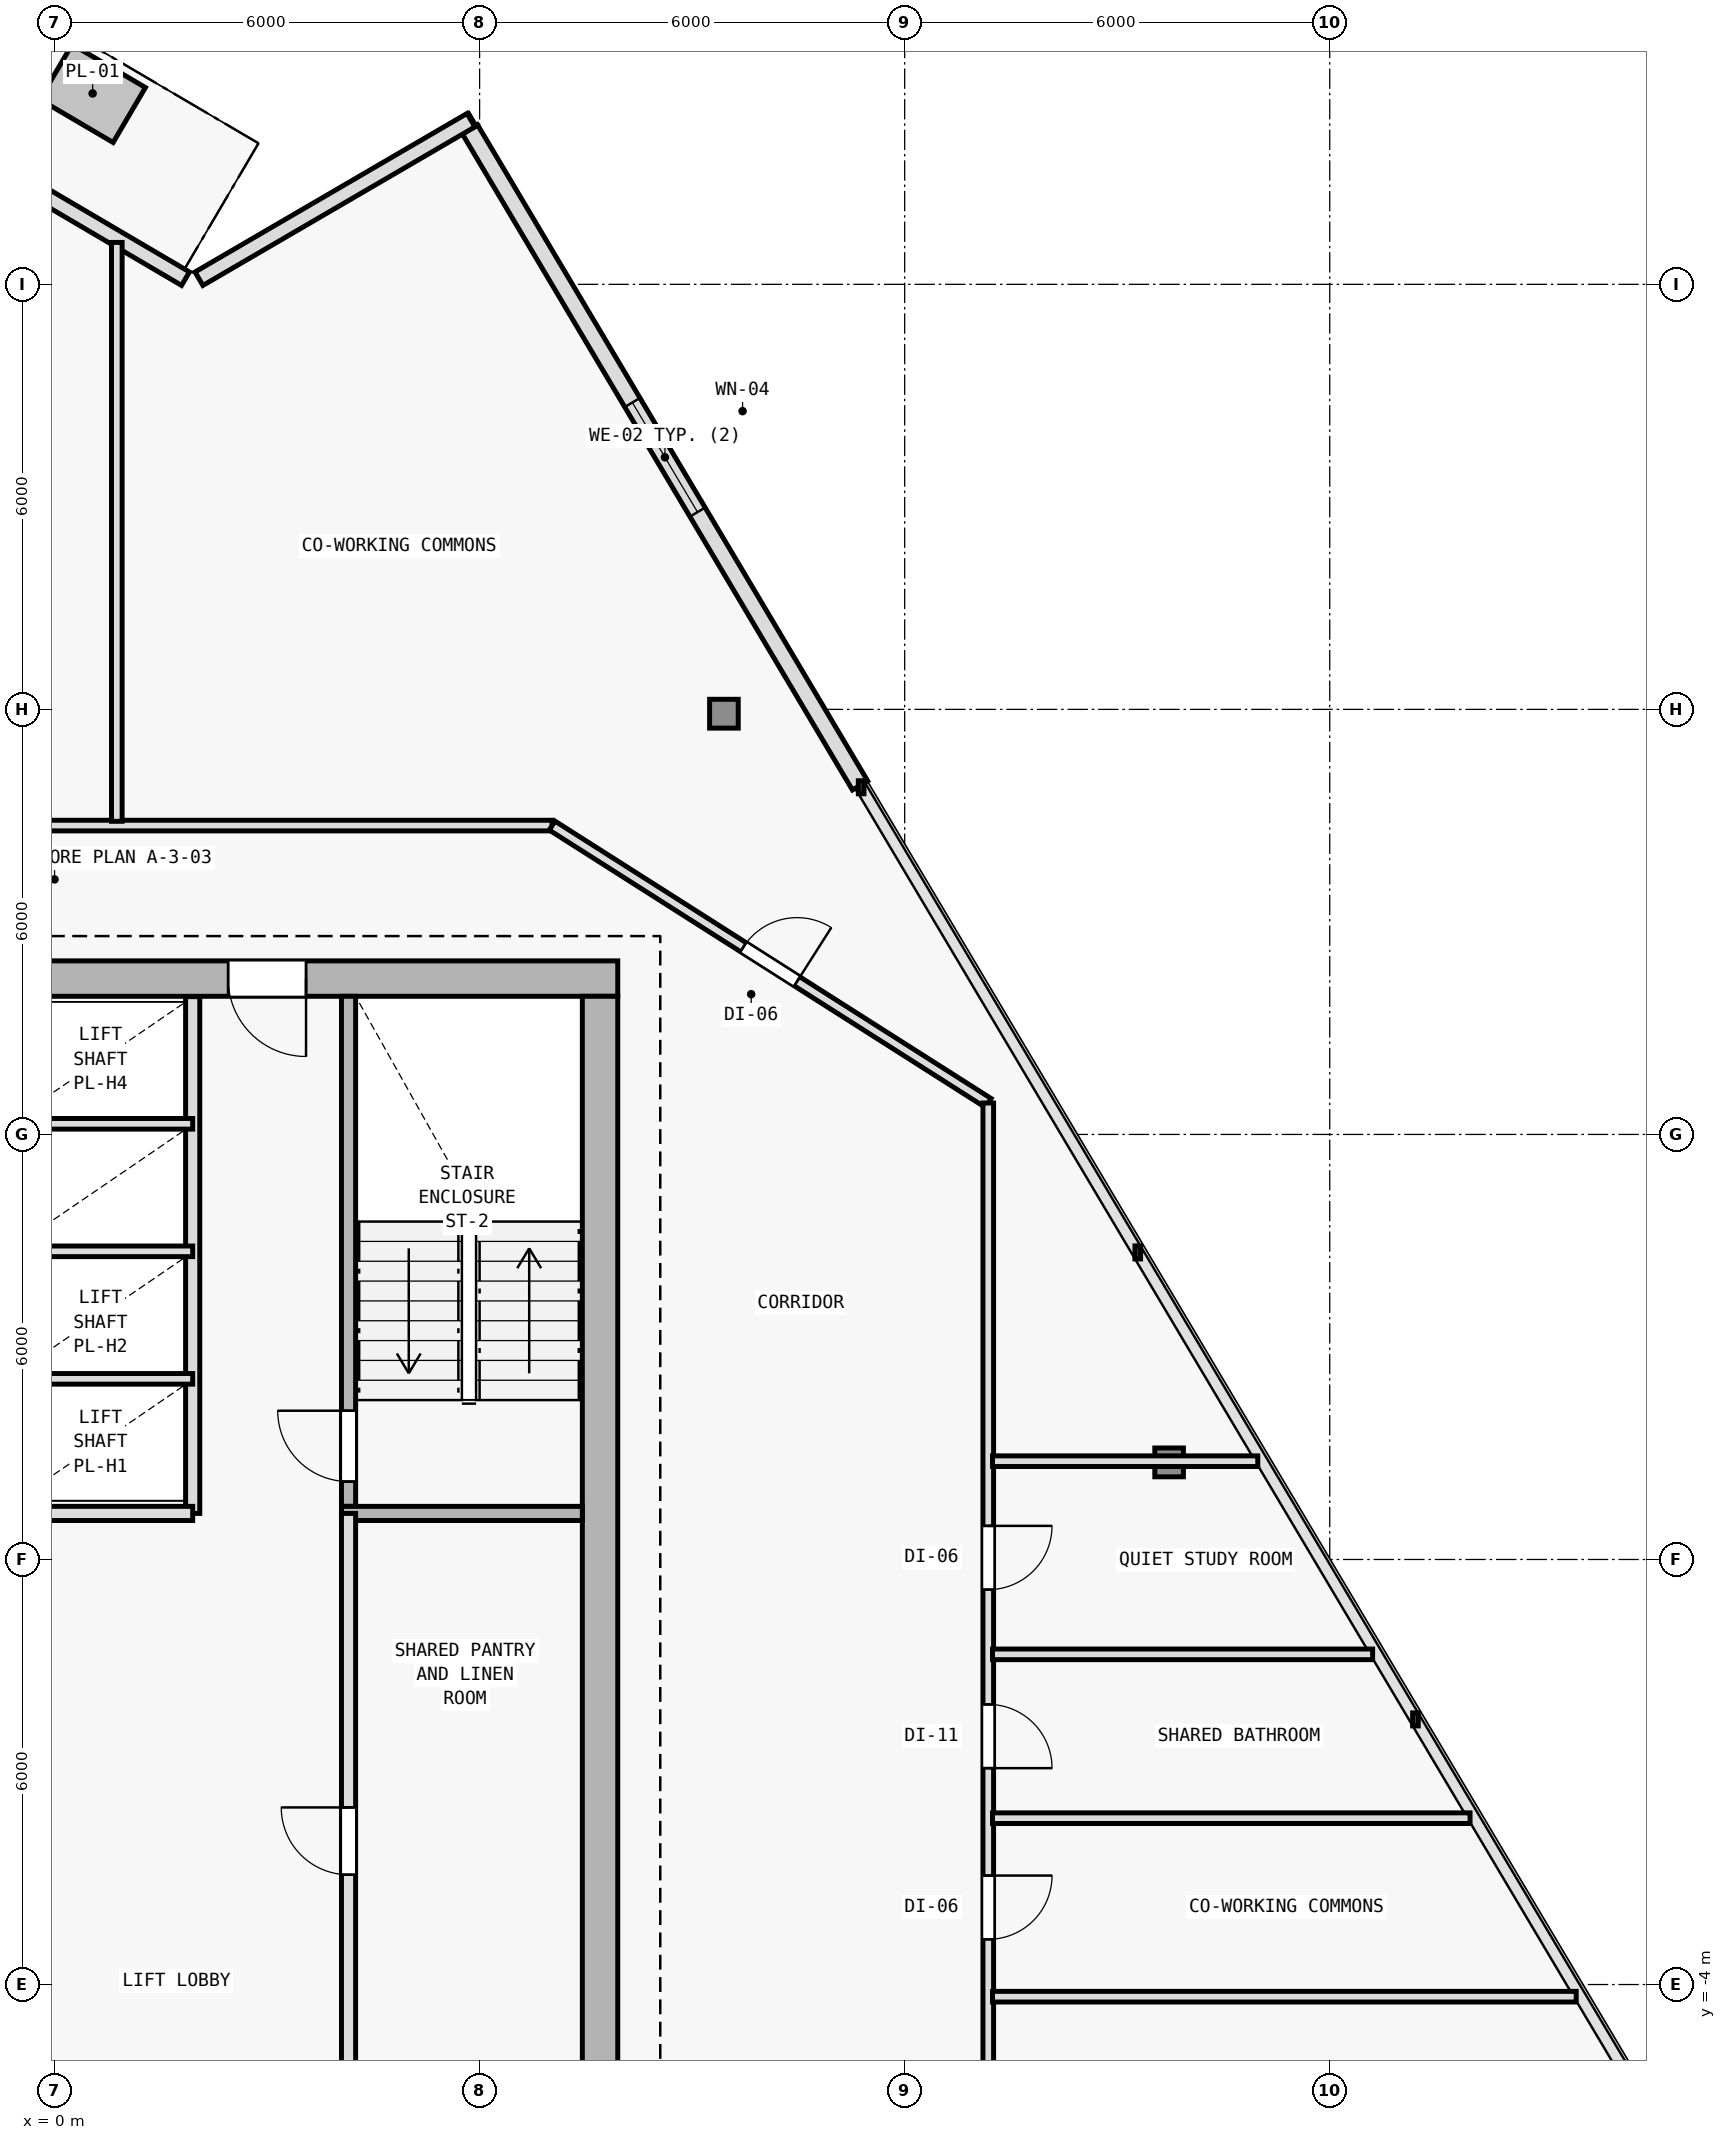
"""IFC4 building model, lengths in metres.
Left out: names, types, materials, properties, quantities, classifications, styles, units other than length and angle.
Written with IfcOpenShell. Run it as: python <this file> out.ifc"""

import sys

from ifc_helpers import new_model, si_unit, direction, frame, frame_2d, origin, origin_2d, place, context, subcontext, project, spatial, rectangle, i_section, extrude, element, fill, save


model = new_model("IFC4")
c1 = context("Model", 3, precision=1e-05, world=origin(), true_north=direction((0.0, 1.0)))
c2 = subcontext(c1, "Body", "Model", "MODEL_VIEW")
j1 = project(units=[si_unit("LENGTHUNIT", "METRE"), si_unit("PLANEANGLEUNIT", "RADIAN")], contexts=[c1])
p1 = place(None, origin())
s1 = spatial("IfcSite", under=j1, at=p1, CompositionType="ELEMENT")
p2 = place(p1, origin())
s2 = spatial("IfcBuilding", under=s1, at=p2, CompositionType="ELEMENT")
p3 = place(p2, frame((0.0, 0.0, 153.0)))
s3 = spatial("IfcBuildingStorey", under=s2, at=p3, CompositionType="ELEMENT", Elevation=153.0)
for number, where, z_axis, x_axis in (
    (1, (7.7, 10.2, 0.0), (0.0, 0.0, 1.0), (1.0, 0.0, 0.0)),
    (2, (7.7, 0.4, 0.0), (0.0, 0.0, 1.0), (1.0, 0.0, 0.0)),
):
    element("IfcColumn", number, at=place(p3, frame(where, z_axis=z_axis, x_axis=x_axis)), inside=s3, PredefinedType="COLUMN", context=c2, shape_type="SweptSolid", body=[
        extrude(i_section(OverallWidth=0.404, OverallDepth=0.407, WebThickness=0.017, FlangeThickness=0.028, FilletRadius=0.015, at=origin_2d()), origin(), (0.0, 0.0, 1.0), 3.6),
    ])
p4 = place(p3, frame((15.733, 3.371, 0.006), z_axis=(-0.018907326549, 0.00952167524, 0.999775900241), x_axis=(-0.449781931574, -0.893138406984, 0.0)))
e3 = element("IfcColumn", 3, at=p4, inside=s3, PredefinedType="COLUMN", context=c2, shape_type="SweptSolid", body=[
    extrude(i_section(OverallWidth=0.404, OverallDepth=0.407, WebThickness=0.017, FlangeThickness=0.028, FilletRadius=0.015, at=origin_2d()), origin(), (0.0, 0.0, 1.0), 3.59),
])
p5 = place(p3, frame((9.448, 13.939, 0.006), z_axis=(-0.011767855299, -0.002516824544, 0.999927588966), x_axis=(0.209143047003, -0.977885057607, 0.0)))
e4 = element("IfcColumn", 4, at=p5, inside=s3, PredefinedType="COLUMN", context=c2, shape_type="SweptSolid", body=[
    extrude(i_section(OverallWidth=0.404, OverallDepth=0.407, WebThickness=0.017, FlangeThickness=0.028, FilletRadius=0.015, at=origin_2d()), origin(), (0.0, 0.0, 1.0), 3.589),
])
p6 = place(p3, frame((5.862, 22.19, 0.0), z_axis=(0.0, 0.0, 1.0), x_axis=(0.511083986456, -0.859530778267, 0.0)))
e5 = element("IfcWall", 5, at=p6, inside=s3, PredefinedType="SOLIDWALL", context=c2, shape_type="SweptSolid", body=[
    extrude(rectangle(XDim=10.778, YDim=0.25, at=frame_2d((5.389, 0.0))), origin(), (0.0, 0.0, 1.0), 3.35),
])
p7 = place(p6, frame((4.489, 0.0, 0.62)))
e6 = element("IfcOpeningElement", 6, at=p7, cuts=e5, PredefinedType="OPENING", context=c2, shape_type="SweptSolid", body=[
    extrude(rectangle(XDim=1.8, YDim=2.1, at=frame_2d((0.9, 1.05))), frame((0.0, 0.135, 0.0), z_axis=(0.0, -1.0, 0.0), x_axis=(1.0, 0.0, 0.0)), (0.0, 0.0, 1.0), 0.27),
])
p8 = place(p3, frame((2.039, 20.079, 0.0), z_axis=(0.0, 0.0, 1.0), x_axis=(0.86398603623, 0.503515768571, 0.0)))
e7 = element("IfcWall", 7, at=p8, inside=s3, PredefinedType="SOLIDWALL", context=c2, shape_type="SweptSolid", body=[
    extrude(rectangle(XDim=4.444, YDim=0.22, at=frame_2d((2.222, 0.0))), origin(), (0.0, 0.0, 1.0), 3.35),
])
p9 = place(p3, frame((-2.385, 22.567, 0.0), z_axis=(0.0, 0.0, 1.0), x_axis=(0.8621258938, -0.506694131839, 0.0)))
e8 = element("IfcWall", 8, at=p9, inside=s3, PredefinedType="SOLIDWALL", context=c2, shape_type="SweptSolid", body=[
    extrude(rectangle(XDim=4.91, YDim=0.22, at=frame_2d((2.455, 0.0))), origin(), (0.0, 0.0, 1.0), 3.35),
])
p10 = place(p9, frame((1.08, 0.0, 0.0)))
e9 = element("IfcOpeningElement", 9, at=p10, cuts=e8, PredefinedType="OPENING", context=c2, shape_type="SweptSolid", body=[
    extrude(rectangle(XDim=1.05, YDim=2.15, at=frame_2d((0.525, 1.075))), frame((0.0, 0.12, 0.0), z_axis=(0.0, -1.0, 0.0), x_axis=(1.0, 0.0, 0.0)), (0.0, 0.0, 1.0), 0.24),
])
p11 = place(p3, frame((7.95, 10.2, 0.0), z_axis=(0.0, 0.0, 1.0), x_axis=(-1.0, 0.0, 0.0)))
e10 = element("IfcWall", 10, at=p11, inside=s3, PredefinedType="SHEAR", context=c2, shape_type="SweptSolid", body=[
    extrude(rectangle(XDim=15.9, YDim=0.5, at=frame_2d((7.95, 0.0))), origin(), (0.0, 0.0, 1.0), 3.35),
])
p12 = place(p11, frame((4.4, 0.0, 0.0)))
e11 = element("IfcOpeningElement", 11, at=p12, cuts=e10, PredefinedType="OPENING", context=c2, shape_type="SweptSolid", body=[
    extrude(rectangle(XDim=1.1, YDim=2.15, at=frame_2d((0.55, 1.075))), frame((0.0, 0.26, 0.0), z_axis=(0.0, -1.0, 0.0), x_axis=(1.0, 0.0, 0.0)), (0.0, 0.0, 1.0), 0.52),
])
p13 = place(p3, frame((7.7, 9.95, 0.0), z_axis=(0.0, 0.0, 1.0), x_axis=(0.0, -1.0, 0.0)))
e12 = element("IfcWall", 12, at=p13, inside=s3, PredefinedType="SHEAR", context=c2, shape_type="SweptSolid", body=[
    extrude(rectangle(XDim=19.1, YDim=0.5, at=frame_2d((9.55, 0.0))), origin(), (0.0, 0.0, 1.0), 3.35),
])
p14 = place(p3, frame((4.15, 2.75, 0.0), z_axis=(0.0, 0.0, 1.0), x_axis=(0.0, 1.0, 0.0)))
e13 = element("IfcWall", 13, at=p14, inside=s3, PredefinedType="SOLIDWALL", context=c2, shape_type="SweptSolid", body=[
    extrude(rectangle(XDim=7.2, YDim=0.2, at=frame_2d((3.6, 0.0))), origin(), (0.0, 0.0, 1.0), 3.35),
])
p15 = place(p14, frame((0.35, 0.0, 0.0)))
e14 = element("IfcOpeningElement", 14, at=p15, cuts=e13, PredefinedType="OPENING", context=c2, shape_type="SweptSolid", body=[
    extrude(rectangle(XDim=1.0, YDim=2.15, at=frame_2d((0.5, 1.075))), frame((0.0, 0.11, 0.0), z_axis=(0.0, -1.0, 0.0), x_axis=(1.0, 0.0, 0.0)), (0.0, 0.0, 1.0), 0.22),
])
p16 = place(p3, frame((4.05, 2.65, 0.0), z_axis=(0.0, 0.0, 1.0), x_axis=(1.0, 0.0, 0.0)))
e15 = element("IfcWall", 15, at=p16, inside=s3, PredefinedType="SOLIDWALL", context=c2, shape_type="SweptSolid", body=[
    extrude(rectangle(XDim=3.4, YDim=0.2, at=frame_2d((1.7, 0.0))), origin(), (0.0, 0.0, 1.0), 3.35),
])
p17 = place(p3, frame((4.15, -6.05, 0.0), z_axis=(0.0, 0.0, 1.0), x_axis=(0.0, 1.0, 0.0)))
e16 = element("IfcWall", 16, at=p17, inside=s3, PredefinedType="SOLIDWALL", context=c2, shape_type="SweptSolid", body=[
    extrude(rectangle(XDim=8.7, YDim=0.2, at=frame_2d((4.35, 0.0))), origin(), (0.0, 0.0, 1.0), 3.35),
])
p18 = place(p17, frame((3.6, 0.0, 0.0)))
e17 = element("IfcOpeningElement", 17, at=p18, cuts=e16, PredefinedType="OPENING", context=c2, shape_type="SweptSolid", body=[
    extrude(rectangle(XDim=0.95, YDim=2.1, at=frame_2d((0.475, 1.05))), frame((0.0, 0.11, 0.0), z_axis=(0.0, -1.0, 0.0), x_axis=(1.0, 0.0, 0.0)), (0.0, 0.0, 1.0), 0.22),
])
p19 = place(p3, frame((1.95, 2.65, 0.0), z_axis=(0.0, 0.0, 1.0), x_axis=(0.0, 1.0, 0.0)))
e18 = element("IfcWall", 18, at=p19, inside=s3, PredefinedType="SOLIDWALL", context=c2, shape_type="SweptSolid", body=[
    extrude(rectangle(XDim=7.295, YDim=0.2, at=frame_2d((3.647, 0.0))), origin(), (0.0, 0.0, 1.0), 3.35),
])
p20 = place(p3, frame((-0.95, 2.65, 0.0), z_axis=(0.0, 0.0, 1.0), x_axis=(1.0, 0.0, 0.0)))
e19 = element("IfcWall", 19, at=p20, inside=s3, PredefinedType="SOLIDWALL", context=c2, shape_type="SweptSolid", body=[
    extrude(rectangle(XDim=2.9, YDim=0.2, at=frame_2d((1.45, 0.0))), origin(), (0.0, 0.0, 1.0), 3.35),
])
for number, where, z_axis, x_axis in (
    (20, (-0.75, 4.55, 0.0), (0.0, 0.0, 1.0), (1.0, 0.0, 0.0)),
    (21, (-0.75, 6.35, 0.0), (0.0, 0.0, 1.0), (1.0, 0.0, 0.0)),
    (22, (-0.75, 8.15, 0.0), (0.0, 0.0, 1.0), (1.0, 0.0, 0.0)),
):
    element("IfcWall", number, at=place(p3, frame(where, z_axis=z_axis, x_axis=x_axis)), inside=s3, PredefinedType="PARTITIONING", context=c2, shape_type="SweptSolid", body=[
        extrude(rectangle(XDim=2.7, YDim=0.15, at=frame_2d((1.35, 0.0))), origin(), (0.0, 0.0, 1.0), 3.35),
    ])
p21 = place(p3, frame((-7.041, 12.36, 0.0), z_axis=(0.0, 0.0, 1.0), x_axis=(1.0, 0.0, 0.0)))
e23 = element("IfcWall", 23, at=p21, inside=s3, PredefinedType="PARTITIONING", context=c2, shape_type="SweptSolid", body=[
    extrude(rectangle(XDim=14.064, YDim=0.15, at=frame_2d((7.032, 0.0))), origin(), (0.0, 0.0, 1.0), 2.965),
])
p22 = place(p21, frame((3.599, 0.0, 0.0)))
e24 = element("IfcOpeningElement", 24, at=p22, cuts=e23, PredefinedType="OPENING", context=c2, shape_type="SweptSolid", body=[
    extrude(rectangle(XDim=0.9, YDim=2.1, at=frame_2d((0.45, 1.05))), frame((0.0, 0.085, 0.0), z_axis=(0.0, -1.0, 0.0), x_axis=(1.0, 0.0, 0.0)), (0.0, 0.0, 1.0), 0.17),
])
p23 = place(p3, frame((7.023, 12.36, 0.0), z_axis=(0.0, 0.0, 1.0), x_axis=(0.84376480085, -0.536713108511, 0.0)))
e25 = element("IfcWall", 25, at=p23, inside=s3, PredefinedType="PARTITIONING", context=c2, shape_type="SweptSolid", body=[
    extrude(rectangle(XDim=7.297, YDim=0.15, at=frame_2d((3.648, 0.0))), origin(), (0.0, 0.0, 1.0), 2.825),
])
p24 = place(p23, frame((3.198, 0.0, 0.0)))
e26 = element("IfcOpeningElement", 26, at=p24, cuts=e25, PredefinedType="OPENING", context=c2, shape_type="SweptSolid", body=[
    extrude(rectangle(XDim=0.9, YDim=2.1, at=frame_2d((0.45, 1.05))), frame((0.0, 0.085, 0.0), z_axis=(0.0, -1.0, 0.0), x_axis=(1.0, 0.0, 0.0)), (0.0, 0.0, 1.0), 0.17),
])
p25 = place(p3, frame((13.18, 8.444, 0.0), z_axis=(0.0, 0.0, 1.0), x_axis=(0.0, -1.0, 0.0)))
e27 = element("IfcWall", 27, at=p25, inside=s3, PredefinedType="PARTITIONING", context=c2, shape_type="SweptSolid", body=[
    extrude(rectangle(XDim=20.004, YDim=0.15, at=frame_2d((10.002, 0.0))), origin(), (0.0, 0.0, 1.0), 2.775),
])
p26 = place(p25, frame((17.264, 0.0, 0.0)))
e28 = element("IfcOpeningElement", 28, at=p26, cuts=e27, PredefinedType="OPENING", context=c2, shape_type="SweptSolid", body=[
    extrude(rectangle(XDim=0.9, YDim=2.1, at=frame_2d((0.45, 1.05))), frame((0.0, 0.085, 0.0), z_axis=(0.0, -1.0, 0.0), x_axis=(1.0, 0.0, 0.0)), (0.0, 0.0, 1.0), 0.17),
])
p27 = place(p25, frame((13.659, 0.0, 0.0)))
e29 = element("IfcOpeningElement", 29, at=p27, cuts=e27, PredefinedType="OPENING", context=c2, shape_type="SweptSolid", body=[
    extrude(rectangle(XDim=0.9, YDim=2.1, at=frame_2d((0.45, 1.05))), frame((0.0, 0.085, 0.0), z_axis=(0.0, -1.0, 0.0), x_axis=(1.0, 0.0, 0.0)), (0.0, 0.0, 1.0), 0.17),
])
p28 = place(p25, frame((10.906, 0.0, 0.0)))
e30 = element("IfcOpeningElement", 30, at=p28, cuts=e27, PredefinedType="OPENING", context=c2, shape_type="SweptSolid", body=[
    extrude(rectangle(XDim=0.9, YDim=2.1, at=frame_2d((0.45, 1.05))), frame((0.0, 0.085, 0.0), z_axis=(0.0, -1.0, 0.0), x_axis=(1.0, 0.0, 0.0)), (0.0, 0.0, 1.0), 0.17),
])
p29 = place(p25, frame((8.489, 0.0, 0.0)))
e31 = element("IfcOpeningElement", 31, at=p29, cuts=e27, PredefinedType="OPENING", context=c2, shape_type="SweptSolid", body=[
    extrude(rectangle(XDim=0.9, YDim=2.1, at=frame_2d((0.45, 1.05))), frame((0.0, 0.085, 0.0), z_axis=(0.0, -1.0, 0.0), x_axis=(1.0, 0.0, 0.0)), (0.0, 0.0, 1.0), 0.17),
])
p30 = place(p25, frame((5.969, 0.0, 0.0)))
e32 = element("IfcOpeningElement", 32, at=p30, cuts=e27, PredefinedType="OPENING", context=c2, shape_type="SweptSolid", body=[
    extrude(rectangle(XDim=0.9, YDim=2.1, at=frame_2d((0.45, 1.05))), frame((0.0, 0.085, 0.0), z_axis=(0.0, -1.0, 0.0), x_axis=(1.0, 0.0, 0.0)), (0.0, 0.0, 1.0), 0.17),
])
p31 = place(p3, frame((13.24, 3.388, 0.0), z_axis=(0.0, 0.0, 1.0), x_axis=(1.0, 0.0, 0.0)))
e33 = element("IfcWall", 33, at=p31, inside=s3, PredefinedType="PARTITIONING", context=c2, shape_type="SweptSolid", body=[
    extrude(rectangle(XDim=3.744, YDim=0.15, at=frame_2d((1.872, 0.0))), origin(), (0.0, 0.0, 1.0), 2.885),
])
p32 = place(p3, frame((13.24, -1.652, 0.0), z_axis=(0.0, 0.0, 1.0), x_axis=(1.0, 0.0, 0.0)))
e34 = element("IfcWall", 34, at=p32, inside=s3, PredefinedType="PARTITIONING", context=c2, shape_type="SweptSolid", body=[
    extrude(rectangle(XDim=6.741, YDim=0.15, at=frame_2d((3.37, 0.0))), origin(), (0.0, 0.0, 1.0), 2.775),
])
p33 = place(p3, frame((13.24, -4.171, 0.0), z_axis=(0.0, 0.0, 1.0), x_axis=(1.0, 0.0, 0.0)))
e35 = element("IfcWall", 35, at=p33, inside=s3, PredefinedType="PARTITIONING", context=c2, shape_type="SweptSolid", body=[
    extrude(rectangle(XDim=8.239, YDim=0.15, at=frame_2d((4.12, 0.0))), origin(), (0.0, 0.0, 1.0), 2.775),
])
p34 = place(p3, frame((13.24, 0.661, 0.0), z_axis=(0.0, 0.0, 1.0), x_axis=(1.0, 0.0, 0.0)))
e36 = element("IfcWall", 36, at=p34, inside=s3, PredefinedType="PARTITIONING", context=c2, shape_type="SweptSolid", body=[
    extrude(rectangle(XDim=5.365, YDim=0.15, at=frame_2d((2.683, 0.0))), origin(), (0.0, 0.0, 1.0), 2.775),
])
p35 = place(p3, frame((0.879, 12.42, 0.0), z_axis=(0.0, 0.0, 1.0), x_axis=(0.0, 1.0, 0.0)))
e37 = element("IfcWall", 37, at=p35, inside=s3, PredefinedType="PARTITIONING", context=c2, shape_type="SweptSolid", body=[
    extrude(rectangle(XDim=8.171, YDim=0.15, at=frame_2d((4.086, 0.0))), origin(), (0.0, 0.0, 1.0), 2.885),
])
p36 = place(p7, origin())
e38 = element("IfcWindow", 38, at=p36, inside=s3, PartitioningType="SINGLE_PANEL", PredefinedType="WINDOW", context=c2, shape_type="SweptSolid", body=[
    extrude(rectangle(XDim=1.8, YDim=2.1, at=frame_2d((0.9, 1.05))), frame((0.0, 0.03, 0.0), z_axis=(0.0, -1.0, 0.0), x_axis=(1.0, 0.0, 0.0)), (0.0, 0.0, 1.0), 0.06),
])
fill(e6, e38)
p37 = place(p12, origin())
e39 = element("IfcDoor", 39, at=p37, inside=s3, OperationType="SINGLE_SWING_LEFT", PredefinedType="DOOR", context=c2, shape_type="SweptSolid", body=[
    extrude(rectangle(XDim=1.1, YDim=2.15, at=frame_2d((0.55, 1.075))), frame((0.0, 0.025, 0.0), z_axis=(0.0, -1.0, 0.0), x_axis=(1.0, 0.0, 0.0)), (0.0, 0.0, 1.0), 0.05),
])
fill(e11, e39)
p38 = place(p15, origin())
e40 = element("IfcDoor", 40, at=p38, inside=s3, OperationType="SINGLE_SWING_RIGHT", PredefinedType="DOOR", context=c2, shape_type="SweptSolid", body=[
    extrude(rectangle(XDim=1.0, YDim=2.15, at=frame_2d((0.5, 1.075))), frame((0.0, 0.025, 0.0), z_axis=(0.0, -1.0, 0.0), x_axis=(1.0, 0.0, 0.0)), (0.0, 0.0, 1.0), 0.05),
])
fill(e14, e40)
p39 = place(p18, origin())
e41 = element("IfcDoor", 41, at=p39, inside=s3, OperationType="SINGLE_SWING_RIGHT", PredefinedType="DOOR", context=c2, shape_type="SweptSolid", body=[
    extrude(rectangle(XDim=0.95, YDim=2.1, at=frame_2d((0.475, 1.05))), frame((0.0, 0.025, 0.0), z_axis=(0.0, -1.0, 0.0), x_axis=(1.0, 0.0, 0.0)), (0.0, 0.0, 1.0), 0.05),
])
fill(e17, e41)
p40 = place(p28, origin())
e42 = element("IfcDoor", 42, at=p40, inside=s3, OperationType="SINGLE_SWING_LEFT", PredefinedType="DOOR", context=c2, shape_type="SweptSolid", body=[
    extrude(rectangle(XDim=0.9, YDim=2.1, at=frame_2d((0.45, 1.05))), frame((0.0, 0.025, 0.0), z_axis=(0.0, -1.0, 0.0), x_axis=(1.0, 0.0, 0.0)), (0.0, 0.0, 1.0), 0.05),
])
fill(e30, e42)
p41 = place(p29, origin())
e43 = element("IfcDoor", 43, at=p41, inside=s3, OperationType="SINGLE_SWING_RIGHT", PredefinedType="DOOR", context=c2, shape_type="SweptSolid", body=[
    extrude(rectangle(XDim=0.9, YDim=2.1, at=frame_2d((0.45, 1.05))), frame((0.0, 0.025, 0.0), z_axis=(0.0, -1.0, 0.0), x_axis=(1.0, 0.0, 0.0)), (0.0, 0.0, 1.0), 0.05),
])
fill(e31, e43)
p42 = place(p30, origin())
e44 = element("IfcDoor", 44, at=p42, inside=s3, OperationType="SINGLE_SWING_LEFT", PredefinedType="DOOR", context=c2, shape_type="SweptSolid", body=[
    extrude(rectangle(XDim=0.9, YDim=2.1, at=frame_2d((0.45, 1.05))), frame((0.0, 0.025, 0.0), z_axis=(0.0, -1.0, 0.0), x_axis=(1.0, 0.0, 0.0)), (0.0, 0.0, 1.0), 0.05),
])
fill(e32, e44)
p43 = place(p24, origin())
e45 = element("IfcDoor", 45, at=p43, inside=s3, OperationType="SINGLE_SWING_RIGHT", PredefinedType="DOOR", context=c2, shape_type="SweptSolid", body=[
    extrude(rectangle(XDim=0.9, YDim=2.1, at=frame_2d((0.45, 1.05))), frame((0.0, 0.025, 0.0), z_axis=(0.0, -1.0, 0.0), x_axis=(1.0, 0.0, 0.0)), (0.0, 0.0, 1.0), 0.05),
])
fill(e26, e45)
save(model, sys.argv[1])
